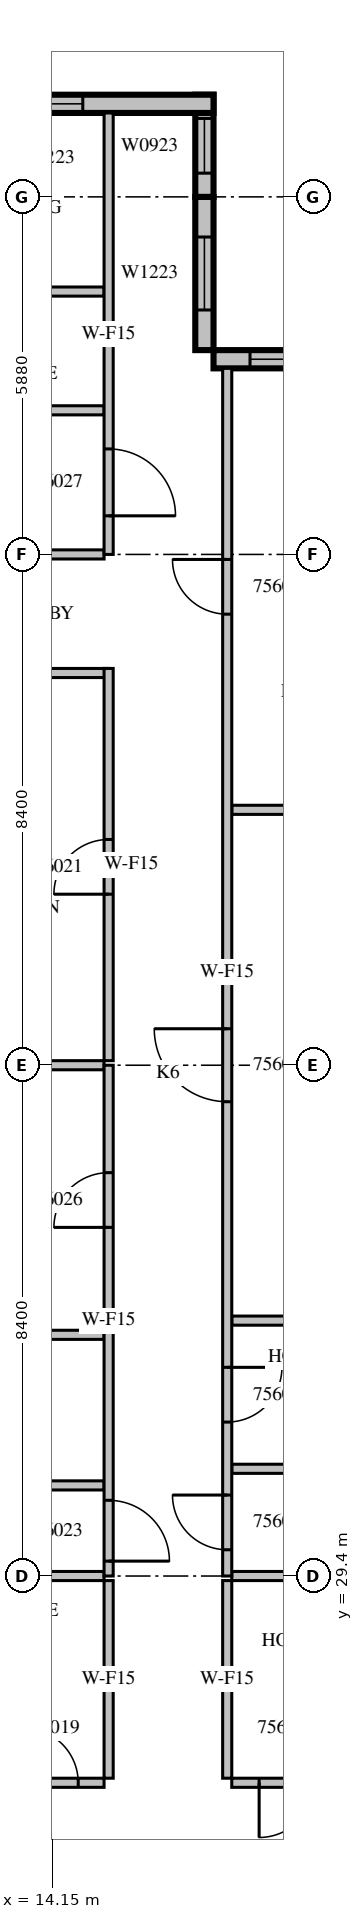
"""IFC4 building model, lengths in metres.
Left out: names, types, materials, properties, quantities, classifications, styles, units other than length and angle.
Written with IfcOpenShell. Run it as: python <this file> out.ifc"""

import sys

from ifc_helpers import new_model, si_unit, direction, frame, frame_2d, origin, place, context, subcontext, project, spatial, rectangle, extrude, source, transform, mapped, element, fill, save


model = new_model("IFC4")
c1 = context("Model", 3, precision=1e-05, world=origin(), true_north=direction((0.0, 1.0)))
c2 = subcontext(c1, "Body", "Model", "MODEL_VIEW")
j1 = project(units=[si_unit("LENGTHUNIT", "METRE"), si_unit("PLANEANGLEUNIT", "RADIAN")], contexts=[c1])
p1 = place(None, origin())
s1 = spatial("IfcSite", under=j1, at=p1, CompositionType="ELEMENT")
p2 = place(p1, origin())
s2 = spatial("IfcBuilding", under=s1, at=p2, CompositionType="ELEMENT")
p3 = place(p2, frame((0.0, 0.0, 246.2)))
s3 = spatial("IfcBuildingStorey", under=s2, at=p3, CompositionType="ELEMENT", Elevation=246.2)
m1 = source(origin(), c2, "Body", "SweptSolid", [
    extrude(rectangle(XDim=4.2, YDim=0.3, at=frame_2d((2.1, 0.0))), origin(), (0.0, 0.0, 1.0), 3.4),
])
p4 = place(p3, frame((21.0, 49.41, 0.0), z_axis=(0.0, 0.0, 1.0), x_axis=(-1.0, 0.0, 0.0)))
e1 = element("IfcWall", 1, at=p4, inside=s3, PredefinedType="STANDARD", context=c2, shape_type="MappedRepresentation", body=[
    mapped(m1, transform((0.0, 0.0, 0.0), scale=1.0)),
])
m2 = source(origin(), c2, "Body", "SweptSolid", [
    extrude(rectangle(XDim=3.0, YDim=2.3, at=frame_2d((1.5, 1.15))), frame((0.0, 0.16, 0.0), z_axis=(0.0, -1.0, 0.0), x_axis=(1.0, 0.0, 0.0)), (0.0, 0.0, 1.0), 0.32),
])
p5 = place(p4, frame((0.6, 0.0, 0.6)))
e2 = element("IfcOpeningElement", 2, at=p5, cuts=e1, PredefinedType="OPENING", context=c2, shape_type="MappedRepresentation", body=[
    mapped(m2, transform((0.0, 0.0, 0.0), scale=1.0)),
])
m3 = source(origin(), c2, "Body", "SweptSolid", [
    extrude(rectangle(XDim=2.52, YDim=0.3, at=frame_2d((1.26, 0.0))), origin(), (0.0, 0.0, 1.0), 3.4),
])
p6 = place(p3, frame((16.65, 49.56, 0.0), z_axis=(0.0, 0.0, 1.0), x_axis=(0.0, 1.0, 0.0)))
e3 = element("IfcWall", 3, at=p6, inside=s3, PredefinedType="STANDARD", context=c2, shape_type="MappedRepresentation", body=[
    mapped(m3, transform((0.0, 0.0, 0.0), scale=1.0)),
])
m4 = source(origin(), c2, "Body", "SweptSolid", [
    extrude(rectangle(XDim=1.2, YDim=2.3, at=frame_2d((0.6, 1.15))), frame((0.0, 0.16, 0.0), z_axis=(0.0, -1.0, 0.0), x_axis=(1.0, 0.0, 0.0)), (0.0, 0.0, 1.0), 0.32),
])
p7 = place(p6, frame((0.66, 0.0, 0.6)))
e4 = element("IfcOpeningElement", 4, at=p7, cuts=e3, PredefinedType="OPENING", context=c2, shape_type="MappedRepresentation", body=[
    mapped(m4, transform((0.0, 0.0, 0.0), scale=1.0)),
])
m5 = source(origin(), c2, "Body", "SweptSolid", [
    extrude(rectangle(XDim=1.68, YDim=0.3, at=frame_2d((0.84, 0.0))), origin(), (0.0, 0.0, 1.0), 3.4),
])
p8 = place(p3, frame((16.65, 52.08, 0.0), z_axis=(0.0, 0.0, 1.0), x_axis=(0.0, 1.0, 0.0)))
e5 = element("IfcWall", 5, at=p8, inside=s3, PredefinedType="STANDARD", context=c2, shape_type="MappedRepresentation", body=[
    mapped(m5, transform((0.0, 0.0, 0.0), scale=1.0)),
])
m6 = source(origin(), c2, "Body", "SweptSolid", [
    extrude(rectangle(XDim=0.9, YDim=2.3, at=frame_2d((0.45, 1.15))), frame((0.0, 0.16, 0.0), z_axis=(0.0, -1.0, 0.0), x_axis=(1.0, 0.0, 0.0)), (0.0, 0.0, 1.0), 0.32),
])
p9 = place(p8, frame((0.39, 0.0, 0.6)))
e6 = element("IfcOpeningElement", 6, at=p9, cuts=e5, PredefinedType="OPENING", context=c2, shape_type="MappedRepresentation", body=[
    mapped(m6, transform((0.0, 0.0, 0.0), scale=1.0)),
])
m7 = source(origin(), c2, "Body", "SweptSolid", [
    extrude(rectangle(XDim=10.5, YDim=0.3, at=frame_2d((5.25, 0.0))), origin(), (0.0, 0.0, 1.0), 3.4),
])
p10 = place(p3, frame((16.8, 53.61, 0.0), z_axis=(0.0, 0.0, 1.0), x_axis=(-1.0, 0.0, 0.0)))
e7 = element("IfcWall", 7, at=p10, inside=s3, PredefinedType="STANDARD", context=c2, shape_type="MappedRepresentation", body=[
    mapped(m7, transform((0.0, 0.0, 0.0), scale=1.0)),
])
p11 = place(p10, frame((2.15, 0.0, 0.6)))
e8 = element("IfcOpeningElement", 8, at=p11, cuts=e7, PredefinedType="OPENING", context=c2, shape_type="MappedRepresentation", body=[
    mapped(m4, transform((0.0, 0.0, 0.0), scale=1.0)),
])
m8 = source(origin(), c2, "Body", "SweptSolid", [
    extrude(rectangle(XDim=1.8, YDim=2.3, at=frame_2d((0.9, 1.15))), frame((0.0, 0.16, 0.0), z_axis=(0.0, -1.0, 0.0), x_axis=(1.0, 0.0, 0.0)), (0.0, 0.0, 1.0), 0.32),
])
p12 = place(p10, frame((8.025, 0.0, 0.6)))
e9 = element("IfcOpeningElement", 9, at=p12, cuts=e7, PredefinedType="OPENING", context=c2, shape_type="MappedRepresentation", body=[
    mapped(m8, transform((0.0, 0.0, 0.0), scale=1.0)),
])
m9 = source(origin(), c2, "Body", "SweptSolid", [
    extrude(rectangle(XDim=8.495, YDim=0.15, at=frame_2d((4.247, 0.0))), origin(), (0.0, 0.0, 1.0), 3.4),
])
p13 = place(p3, frame((6.505, 26.0, 0.0), z_axis=(0.0, 0.0, 1.0), x_axis=(1.0, 0.0, 0.0)))
e10 = element("IfcWall", 10, at=p13, inside=s3, PredefinedType="PARTITIONING", context=c2, shape_type="MappedRepresentation", body=[
    mapped(m9, transform((0.0, 0.0, 0.0), scale=1.0)),
])
m10 = source(origin(), c2, "Body", "SweptSolid", [
    extrude(rectangle(XDim=0.9, YDim=2.1, at=frame_2d((0.45, 1.05))), frame((0.0, 0.085, 0.0), z_axis=(0.0, -1.0, 0.0), x_axis=(1.0, 0.0, 0.0)), (0.0, 0.0, 1.0), 0.17),
])
p14 = place(p13, frame((2.095, 0.0, 0.0)))
e11 = element("IfcOpeningElement", 11, at=p14, cuts=e10, PredefinedType="OPENING", context=c2, shape_type="MappedRepresentation", body=[
    mapped(m10, transform((0.0, 0.0, 0.0), scale=1.0)),
])
p15 = place(p13, frame((7.17, 0.0, 0.0)))
e12 = element("IfcOpeningElement", 12, at=p15, cuts=e10, PredefinedType="OPENING", context=c2, shape_type="MappedRepresentation", body=[
    mapped(m10, transform((0.0, 0.0, 0.0), scale=1.0)),
])
m11 = source(origin(), c2, "Body", "SweptSolid", [
    extrude(rectangle(XDim=3.6, YDim=0.15, at=frame_2d((1.8, 0.0))), origin(), (0.0, 0.0, 1.0), 3.4),
])
p16 = place(p3, frame((17.1, 26.0, 0.0), z_axis=(0.0, 0.0, 1.0), x_axis=(1.0, 0.0, 0.0)))
e13 = element("IfcWall", 13, at=p16, inside=s3, PredefinedType="PARTITIONING", context=c2, shape_type="MappedRepresentation", body=[
    mapped(m11, transform((0.0, 0.0, 0.0), scale=1.0)),
])
p17 = place(p16, frame((0.45, 0.0, 0.0)))
e14 = element("IfcOpeningElement", 14, at=p17, cuts=e13, PredefinedType="OPENING", context=c2, shape_type="MappedRepresentation", body=[
    mapped(m10, transform((0.0, 0.0, 0.0), scale=1.0)),
])
m12 = source(origin(), c2, "Body", "SweptSolid", [
    extrude(rectangle(XDim=3.25, YDim=0.15, at=frame_2d((1.625, 0.0))), origin(), (0.0, 0.0, 1.0), 3.4),
])
for number, where, z_axis, x_axis in (
    (15, (15.075, 26.075, 0.0), (0.0, 0.0, 1.0), (0.0, 1.0, 0.0)),
    (16, (17.025, 29.325, 0.0), (0.0, 0.0, 1.0), (0.0, -1.0, 0.0)),
):
    element("IfcWall", number, at=place(p3, frame(where, z_axis=z_axis, x_axis=x_axis)), inside=s3, PredefinedType="PARTITIONING", context=c2, shape_type="MappedRepresentation", body=[
        mapped(m12, transform((0.0, 0.0, 0.0), scale=1.0)),
    ])
m13 = source(origin(), c2, "Body", "SweptSolid", [
    extrude(rectangle(XDim=4.101, YDim=0.15, at=frame_2d((2.05, 0.0))), origin(), (0.0, 0.0, 1.0), 3.4),
])
p18 = place(p3, frame((15.0, 29.4, 0.0), z_axis=(0.0, 0.0, 1.0), x_axis=(-1.0, 0.0, 0.0)))
e17 = element("IfcWall", 17, at=p18, inside=s3, PredefinedType="PARTITIONING", context=c2, shape_type="MappedRepresentation", body=[
    mapped(m13, transform((0.0, 0.0, 0.0), scale=1.0)),
])
m14 = source(origin(), c2, "Body", "SweptSolid", [
    extrude(rectangle(XDim=3.101, YDim=0.15, at=frame_2d((1.55, 0.0))), origin(), (0.0, 0.0, 1.0), 3.4),
])
p19 = place(p3, frame((20.201, 29.4, 0.0), z_axis=(0.0, 0.0, 1.0), x_axis=(-1.0, 0.0, 0.0)))
e18 = element("IfcWall", 18, at=p19, inside=s3, PredefinedType="PARTITIONING", context=c2, shape_type="MappedRepresentation", body=[
    mapped(m14, transform((0.0, 0.0, 0.0), scale=1.0)),
])
m15 = source(origin(), c2, "Body", "SweptSolid", [
    extrude(rectangle(XDim=3.175, YDim=0.15, at=frame_2d((1.587, 0.0))), origin(), (0.0, 0.0, 1.0), 3.4),
])
p20 = place(p3, frame((15.075, 44.25, 0.0), z_axis=(0.0, 0.0, 1.0), x_axis=(-1.0, 0.0, 0.0)))
e19 = element("IfcWall", 19, at=p20, inside=s3, PredefinedType="PARTITIONING", context=c2, shape_type="MappedRepresentation", body=[
    mapped(m15, transform((0.0, 0.0, 0.0), scale=1.0)),
])
m16 = source(origin(), c2, "Body", "SweptSolid", [
    extrude(rectangle(XDim=6.45, YDim=0.15, at=frame_2d((3.225, 0.0))), origin(), (0.0, 0.0, 1.0), 3.4),
])
p21 = place(p3, frame((15.075, 37.875, 0.0), z_axis=(0.0, 0.0, 1.0), x_axis=(0.0, 1.0, 0.0)))
e20 = element("IfcWall", 20, at=p21, inside=s3, PredefinedType="PARTITIONING", context=c2, shape_type="MappedRepresentation", body=[
    mapped(m16, transform((0.0, 0.0, 0.0), scale=1.0)),
])
p22 = place(p21, frame((2.737, 0.0, 0.0)))
e21 = element("IfcOpeningElement", 21, at=p22, cuts=e20, PredefinedType="OPENING", context=c2, shape_type="MappedRepresentation", body=[
    mapped(m10, transform((0.0, 0.0, 0.0), scale=1.0)),
])
m17 = source(origin(), c2, "Body", "SweptSolid", [
    extrude(rectangle(XDim=3.95, YDim=0.15, at=frame_2d((1.975, 0.0))), origin(), (0.0, 0.0, 1.0), 3.4),
])
for number, where, z_axis, x_axis in (
    (22, (15.0, 30.89, 0.0), (0.0, 0.0, 1.0), (-1.0, 0.0, 0.0)),
    (23, (15.0, 33.367, 0.0), (0.0, 0.0, 1.0), (-1.0, 0.0, 0.0)),
    (24, (15.0, 37.8, 0.0), (0.0, 0.0, 1.0), (-1.0, 0.0, 0.0)),
    (25, (15.0, 48.57, 0.0), (0.0, 0.0, 1.0), (-1.0, 0.0, 0.0)),
    (26, (15.0, 50.523, 0.0), (0.0, 0.0, 1.0), (-1.0, 0.0, 0.0)),
    (27, (15.0, 46.2, 0.0), (0.0, 0.0, 1.0), (-1.0, 0.0, 0.0)),
):
    element("IfcWall", number, at=place(p3, frame(where, z_axis=z_axis, x_axis=x_axis)), inside=s3, PredefinedType="PARTITIONING", context=c2, shape_type="MappedRepresentation", body=[
        mapped(m17, transform((0.0, 0.0, 0.0), scale=1.0)),
    ])
for number, where, z_axis, x_axis in (
    (28, (17.1, 31.163, 0.0), (0.0, 0.0, 1.0), (1.0, 0.0, 0.0)),
    (29, (20.7, 33.6, 0.0), (0.0, 0.0, 1.0), (-1.0, 0.0, 0.0)),
    (30, (20.7, 42.0, 0.0), (0.0, 0.0, 1.0), (-1.0, 0.0, 0.0)),
):
    element("IfcWall", number, at=place(p3, frame(where, z_axis=z_axis, x_axis=x_axis)), inside=s3, PredefinedType="PARTITIONING", context=c2, shape_type="MappedRepresentation", body=[
        mapped(m11, transform((0.0, 0.0, 0.0), scale=1.0)),
    ])
m18 = source(origin(), c2, "Body", "SweptSolid", [
    extrude(rectangle(XDim=8.4, YDim=0.15, at=frame_2d((4.2, 0.0))), origin(), (0.0, 0.0, 1.0), 3.4),
])
p23 = place(p3, frame((15.075, 29.4, 0.0), z_axis=(0.0, 0.0, 1.0), x_axis=(0.0, 1.0, 0.0)))
e31 = element("IfcWall", 31, at=p23, inside=s3, PredefinedType="PARTITIONING", context=c2, shape_type="MappedRepresentation", body=[
    mapped(m18, transform((0.0, 0.0, 0.0), scale=1.0)),
])
m19 = source(origin(), c2, "Body", "SweptSolid", [
    extrude(rectangle(XDim=1.0, YDim=2.1, at=frame_2d((0.5, 1.05))), frame((0.0, 0.085, 0.0), z_axis=(0.0, -1.0, 0.0), x_axis=(1.0, 0.0, 0.0)), (0.0, 0.0, 1.0), 0.17),
])
p24 = place(p23, frame((0.245, 0.0, 0.0)))
e32 = element("IfcOpeningElement", 32, at=p24, cuts=e31, PredefinedType="OPENING", context=c2, shape_type="MappedRepresentation", body=[
    mapped(m19, transform((0.0, 0.0, 0.0), scale=1.0)),
])
p25 = place(p23, frame((5.733, 0.0, 0.0)))
e33 = element("IfcOpeningElement", 33, at=p25, cuts=e31, PredefinedType="OPENING", context=c2, shape_type="MappedRepresentation", body=[
    mapped(m10, transform((0.0, 0.0, 0.0), scale=1.0)),
])
m20 = source(origin(), c2, "Body", "SweptSolid", [
    extrude(rectangle(XDim=7.26, YDim=0.15, at=frame_2d((3.63, 0.0))), origin(), (0.0, 0.0, 1.0), 3.4),
])
p26 = place(p3, frame((15.075, 46.2, 0.0), z_axis=(0.0, 0.0, 1.0), x_axis=(0.0, 1.0, 0.0)))
e34 = element("IfcWall", 34, at=p26, inside=s3, PredefinedType="PARTITIONING", context=c2, shape_type="MappedRepresentation", body=[
    mapped(m20, transform((0.0, 0.0, 0.0), scale=1.0)),
])
m21 = source(origin(), c2, "Body", "SweptSolid", [
    extrude(rectangle(XDim=1.1, YDim=2.1, at=frame_2d((0.55, 1.05))), frame((0.0, 0.085, 0.0), z_axis=(0.0, -1.0, 0.0), x_axis=(1.0, 0.0, 0.0)), (0.0, 0.0, 1.0), 0.17),
])
p27 = place(p26, frame((0.635, 0.0, 0.0)))
e35 = element("IfcOpeningElement", 35, at=p27, cuts=e34, PredefinedType="OPENING", context=c2, shape_type="MappedRepresentation", body=[
    mapped(m21, transform((0.0, 0.0, 0.0), scale=1.0)),
])
m22 = source(origin(), c2, "Body", "SweptSolid", [
    extrude(rectangle(XDim=19.86, YDim=0.15, at=frame_2d((9.93, 0.0))), origin(), (0.0, 0.0, 1.0), 3.4),
])
p28 = place(p3, frame((17.025, 49.26, 0.0), z_axis=(0.0, 0.0, 1.0), x_axis=(0.0, -1.0, 0.0)))
e36 = element("IfcWall", 36, at=p28, inside=s3, PredefinedType="PARTITIONING", context=c2, shape_type="MappedRepresentation", body=[
    mapped(m22, transform((0.0, 0.0, 0.0), scale=1.0)),
])
p29 = place(p28, frame((18.528, 0.0, 0.0)))
e37 = element("IfcOpeningElement", 37, at=p29, cuts=e36, PredefinedType="OPENING", context=c2, shape_type="MappedRepresentation", body=[
    mapped(m10, transform((0.0, 0.0, 0.0), scale=1.0)),
])
p30 = place(p28, frame((16.428, 0.0, 0.0)))
e38 = element("IfcOpeningElement", 38, at=p30, cuts=e36, PredefinedType="OPENING", context=c2, shape_type="MappedRepresentation", body=[
    mapped(m10, transform((0.0, 0.0, 0.0), scale=1.0)),
])
m23 = source(origin(), c2, "Body", "SweptSolid", [
    extrude(rectangle(XDim=1.2, YDim=2.1, at=frame_2d((0.6, 1.05))), frame((0.0, 0.085, 0.0), z_axis=(0.0, -1.0, 0.0), x_axis=(1.0, 0.0, 0.0)), (0.0, 0.0, 1.0), 0.17),
])
p31 = place(p28, frame((10.86, 0.0, 0.0)))
e39 = element("IfcOpeningElement", 39, at=p31, cuts=e36, PredefinedType="OPENING", context=c2, shape_type="MappedRepresentation", body=[
    mapped(m23, transform((0.0, 0.0, 0.0), scale=1.0)),
])
p32 = place(p28, frame((3.143, 0.0, 0.0)))
e40 = element("IfcOpeningElement", 40, at=p32, cuts=e36, PredefinedType="OPENING", context=c2, shape_type="MappedRepresentation", body=[
    mapped(m10, transform((0.0, 0.0, 0.0), scale=1.0)),
])
m24 = source(origin(), c2, "Body", "SweptSolid", [
    extrude(rectangle(XDim=3.0, YDim=2.3, at=frame_2d((1.5, 1.15))), frame((0.0, 0.03, 0.0), z_axis=(0.0, -1.0, 0.0), x_axis=(1.0, 0.0, 0.0)), (0.0, 0.0, 1.0), 0.06),
])
p33 = place(p5, origin())
e41 = element("IfcWindow", 41, at=p33, inside=s3, PartitioningType="SINGLE_PANEL", PredefinedType="WINDOW", context=c2, shape_type="MappedRepresentation", body=[
    mapped(m24, transform((0.0, 0.0, 0.0), scale=1.0)),
])
fill(e2, e41)
m25 = source(origin(), c2, "Body", "SweptSolid", [
    extrude(rectangle(XDim=1.2, YDim=2.3, at=frame_2d((0.6, 1.15))), frame((0.0, 0.03, 0.0), z_axis=(0.0, -1.0, 0.0), x_axis=(1.0, 0.0, 0.0)), (0.0, 0.0, 1.0), 0.06),
])
p34 = place(p7, origin())
e42 = element("IfcWindow", 42, at=p34, inside=s3, PartitioningType="SINGLE_PANEL", PredefinedType="WINDOW", context=c2, shape_type="MappedRepresentation", body=[
    mapped(m25, transform((0.0, 0.0, 0.0), scale=1.0)),
])
fill(e4, e42)
m26 = source(origin(), c2, "Body", "SweptSolid", [
    extrude(rectangle(XDim=0.9, YDim=2.3, at=frame_2d((0.45, 1.15))), frame((0.0, 0.03, 0.0), z_axis=(0.0, -1.0, 0.0), x_axis=(1.0, 0.0, 0.0)), (0.0, 0.0, 1.0), 0.06),
])
p35 = place(p9, origin())
e43 = element("IfcWindow", 43, at=p35, inside=s3, PartitioningType="SINGLE_PANEL", PredefinedType="WINDOW", context=c2, shape_type="MappedRepresentation", body=[
    mapped(m26, transform((0.0, 0.0, 0.0), scale=1.0)),
])
fill(e6, e43)
p36 = place(p11, origin())
e44 = element("IfcWindow", 44, at=p36, inside=s3, PartitioningType="SINGLE_PANEL", PredefinedType="WINDOW", context=c2, shape_type="MappedRepresentation", body=[
    mapped(m25, transform((0.0, 0.0, 0.0), scale=1.0)),
])
fill(e8, e44)
m27 = source(origin(), c2, "Body", "SweptSolid", [
    extrude(rectangle(XDim=0.9, YDim=2.1, at=frame_2d((0.45, 1.05))), frame((0.0, 0.025, 0.0), z_axis=(0.0, -1.0, 0.0), x_axis=(1.0, 0.0, 0.0)), (0.0, 0.0, 1.0), 0.05),
])
p37 = place(p15, origin())
e45 = element("IfcDoor", 45, at=p37, inside=s3, OperationType="SINGLE_SWING_LEFT", PredefinedType="DOOR", context=c2, shape_type="MappedRepresentation", body=[
    mapped(m27, transform((0.0, 0.0, 0.0), scale=1.0)),
])
fill(e12, e45)
p38 = place(p17, origin())
e46 = element("IfcDoor", 46, at=p38, inside=s3, OperationType="SINGLE_SWING_RIGHT", PredefinedType="DOOR", context=c2, shape_type="MappedRepresentation", body=[
    mapped(m27, transform((0.0, 0.0, 0.0), scale=1.0)),
])
fill(e14, e46)
p39 = place(p22, origin())
e47 = element("IfcDoor", 47, at=p39, inside=s3, OperationType="SINGLE_SWING_LEFT", PredefinedType="DOOR", context=c2, shape_type="MappedRepresentation", body=[
    mapped(m27, transform((0.0, 0.0, 0.0), scale=1.0)),
])
fill(e21, e47)
m28 = source(origin(), c2, "Body", "SweptSolid", [
    extrude(rectangle(XDim=1.0, YDim=2.1, at=frame_2d((0.5, 1.05))), frame((0.0, 0.025, 0.0), z_axis=(0.0, -1.0, 0.0), x_axis=(1.0, 0.0, 0.0)), (0.0, 0.0, 1.0), 0.05),
])
p40 = place(p24, origin())
e48 = element("IfcDoor", 48, at=p40, inside=s3, OperationType="SINGLE_SWING_RIGHT", PredefinedType="DOOR", context=c2, shape_type="MappedRepresentation", body=[
    mapped(m28, transform((0.0, 0.0, 0.0), scale=1.0)),
])
fill(e32, e48)
p41 = place(p25, origin())
e49 = element("IfcDoor", 49, at=p41, inside=s3, OperationType="SINGLE_SWING_LEFT", PredefinedType="DOOR", context=c2, shape_type="MappedRepresentation", body=[
    mapped(m27, transform((0.0, 0.0, 0.0), scale=1.0)),
])
fill(e33, e49)
m29 = source(origin(), c2, "Body", "SweptSolid", [
    extrude(rectangle(XDim=1.1, YDim=2.1, at=frame_2d((0.55, 1.05))), frame((0.0, 0.025, 0.0), z_axis=(0.0, -1.0, 0.0), x_axis=(1.0, 0.0, 0.0)), (0.0, 0.0, 1.0), 0.05),
])
p42 = place(p27, origin())
e50 = element("IfcDoor", 50, at=p42, inside=s3, OperationType="SINGLE_SWING_RIGHT", PredefinedType="DOOR", context=c2, shape_type="MappedRepresentation", body=[
    mapped(m29, transform((0.0, 0.0, 0.0), scale=1.0)),
])
fill(e35, e50)
p43 = place(p29, origin())
e51 = element("IfcDoor", 51, at=p43, inside=s3, OperationType="SINGLE_SWING_RIGHT", PredefinedType="DOOR", context=c2, shape_type="MappedRepresentation", body=[
    mapped(m27, transform((0.0, 0.0, 0.0), scale=1.0)),
])
fill(e37, e51)
p44 = place(p30, origin())
e52 = element("IfcDoor", 52, at=p44, inside=s3, OperationType="SINGLE_SWING_LEFT", PredefinedType="DOOR", context=c2, shape_type="MappedRepresentation", body=[
    mapped(m27, transform((0.0, 0.0, 0.0), scale=1.0)),
])
fill(e38, e52)
m30 = source(origin(), c2, "Body", "SweptSolid", [
    extrude(rectangle(XDim=1.2, YDim=2.1, at=frame_2d((0.6, 1.05))), frame((0.0, 0.025, 0.0), z_axis=(0.0, -1.0, 0.0), x_axis=(1.0, 0.0, 0.0)), (0.0, 0.0, 1.0), 0.05),
])
p45 = place(p31, origin())
e53 = element("IfcDoor", 53, at=p45, inside=s3, OperationType="SINGLE_SWING_RIGHT", PredefinedType="DOOR", context=c2, shape_type="MappedRepresentation", body=[
    mapped(m30, transform((0.0, 0.0, 0.0), scale=1.0)),
])
fill(e39, e53)
p46 = place(p32, origin())
e54 = element("IfcDoor", 54, at=p46, inside=s3, OperationType="SINGLE_SWING_RIGHT", PredefinedType="DOOR", context=c2, shape_type="MappedRepresentation", body=[
    mapped(m27, transform((0.0, 0.0, 0.0), scale=1.0)),
])
fill(e40, e54)
save(model, sys.argv[1])
